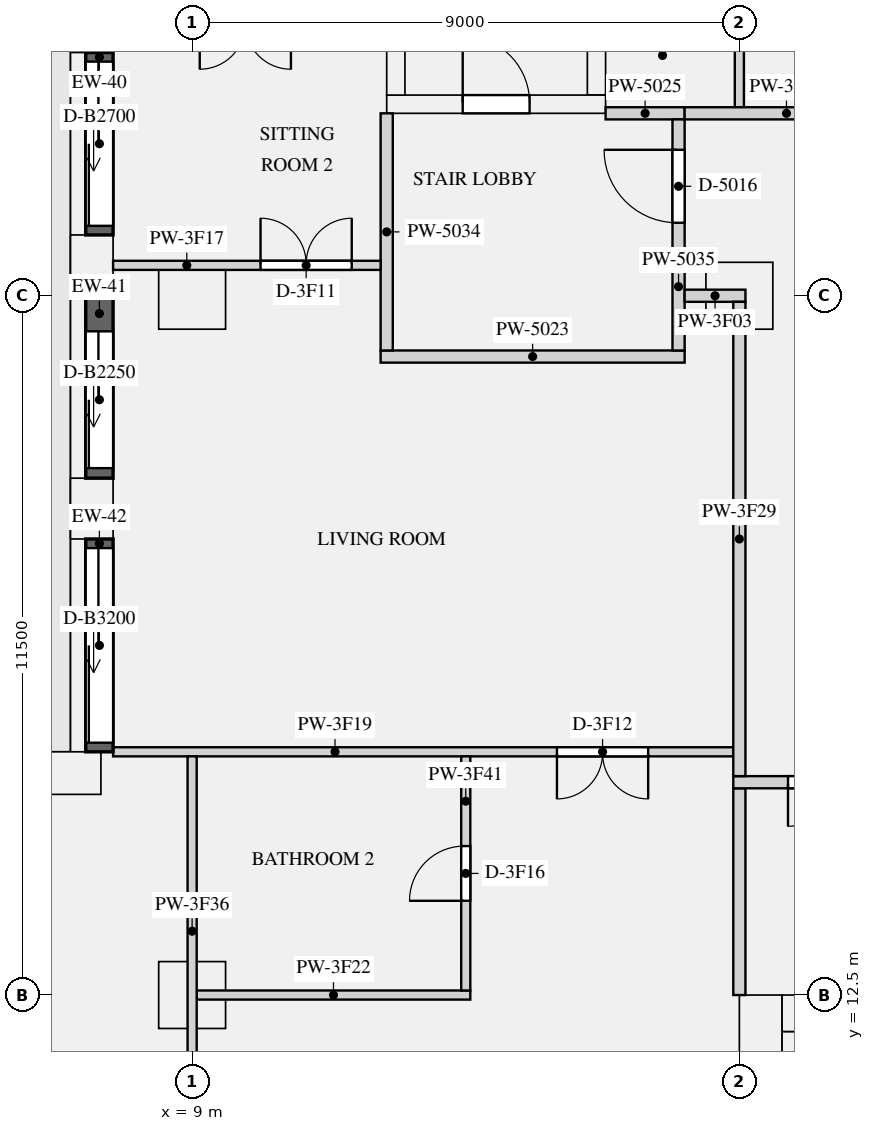
"""IFC4 building model, lengths in metres.
Left out: names, types, materials, properties, quantities, classifications, styles, units other than length and angle.
Written with IfcOpenShell. Run it as: python <this file> out.ifc"""

import sys

from ifc_helpers import new_model, si_unit, direction, frame, frame_2d, origin, origin_2d, place, context, subcontext, project, spatial, rectangle, extrude, element, fill, save


model = new_model("IFC4")
c1 = context("Model", 3, precision=1e-05, world=origin(), true_north=direction((0.0, 1.0)))
c2 = subcontext(c1, "Body", "Model", "MODEL_VIEW")
j1 = project(units=[si_unit("LENGTHUNIT", "METRE"), si_unit("PLANEANGLEUNIT", "RADIAN")], contexts=[c1])
p1 = place(None, origin())
s1 = spatial("IfcSite", under=j1, at=p1, CompositionType="ELEMENT")
p2 = place(p1, origin())
s2 = spatial("IfcBuilding", under=s1, at=p2, CompositionType="ELEMENT")
p3 = place(p2, frame((0.0, 0.0, 182.25)))
s3 = spatial("IfcBuildingStorey", under=s2, at=p3, CompositionType="ELEMENT", Elevation=182.25)
for number, where, z_axis, x_axis in (
    (1, (7.35, 24.5, 0.0), (0.0, 0.0, 1.0), (0.0, -1.0, 0.0)),
    (2, (7.35, 20.5, 0.0), (0.0, 0.0, 1.0), (0.0, -1.0, 0.0)),
    (3, (7.0, 16.15, 0.0), (0.0, 0.0, 1.0), (-1.0, 0.0, 0.0)),
):
    element("IfcColumn", number, at=place(p3, frame(where, z_axis=z_axis, x_axis=x_axis)), inside=s3, PredefinedType="USERDEFINED", context=c2, shape_type="SweptSolid", body=[
        extrude(rectangle(XDim=1.0, YDim=0.7, at=origin_2d()), origin(), (0.0, 0.0, 1.0), 2.65),
    ])
for number, where, z_axis, x_axis in (
    (4, (9.0, 24.0, 0.0), (0.0, 0.0, 1.0), (1.0, 0.0, 0.0)),
    (5, (18.0, 24.0, 0.0), (0.0, 0.0, 1.0), (1.0, 0.0, 0.0)),
    (6, (9.0, 12.5, 0.0), (0.0, 0.0, 1.0), (1.0, 0.0, 0.0)),
):
    element("IfcColumn", number, at=place(p3, frame(where, z_axis=z_axis, x_axis=x_axis)), inside=s3, PredefinedType="COLUMN", context=c2, shape_type="SweptSolid", body=[
        extrude(rectangle(XDim=1.1, YDim=1.1, at=origin_2d()), origin(), (0.0, 0.0, 1.0), 3.15),
    ])
p4 = place(p3, frame((18.35, 0.0, 0.0), z_axis=(0.0, 0.0, 1.0), x_axis=(0.0, 1.0, 0.0)))
e7 = element("IfcWall", 7, at=p4, inside=s3, PredefinedType="SHEAR", context=c2, shape_type="SweptSolid", body=[
    extrude(rectangle(XDim=12.5, YDim=0.7, at=frame_2d((6.25, 0.0))), origin(), (0.0, 0.0, 1.0), 3.15),
])
p5 = place(p3, frame((18.7, 12.2, 0.0), z_axis=(0.0, 0.0, 1.0), x_axis=(1.0, 0.0, 0.0)))
e8 = element("IfcWall", 8, at=p5, inside=s3, PredefinedType="SHEAR", context=c2, shape_type="SweptSolid", body=[
    extrude(rectangle(XDim=34.6, YDim=0.6, at=frame_2d((17.3, 0.0))), origin(), (0.0, 0.0, 1.0), 3.15),
])
p6 = place(p5, frame((24.475, 0.0, 0.0)))
e9 = element("IfcOpeningElement", 9, at=p6, cuts=e8, PredefinedType="OPENING", context=c2, shape_type="SweptSolid", body=[
    extrude(rectangle(XDim=1.1, YDim=2.1, at=frame_2d((0.55, 1.05))), frame((0.0, 0.31, 0.0), z_axis=(0.0, -1.0, 0.0), x_axis=(1.0, 0.0, 0.0)), (0.0, 0.0, 1.0), 0.62),
])
p7 = place(p5, frame((26.725, 0.0, 0.0)))
e10 = element("IfcOpeningElement", 10, at=p7, cuts=e8, PredefinedType="OPENING", context=c2, shape_type="SweptSolid", body=[
    extrude(rectangle(XDim=1.1, YDim=2.1, at=frame_2d((0.55, 1.05))), frame((0.0, 0.31, 0.0), z_axis=(0.0, -1.0, 0.0), x_axis=(1.0, 0.0, 0.0)), (0.0, 0.0, 1.0), 0.62),
])
p8 = place(p5, frame((28.975, 0.0, 0.0)))
e11 = element("IfcOpeningElement", 11, at=p8, cuts=e8, PredefinedType="OPENING", context=c2, shape_type="SweptSolid", body=[
    extrude(rectangle(XDim=1.1, YDim=2.1, at=frame_2d((0.55, 1.05))), frame((0.0, 0.31, 0.0), z_axis=(0.0, -1.0, 0.0), x_axis=(1.0, 0.0, 0.0)), (0.0, 0.0, 1.0), 0.62),
])
p9 = place(p5, frame((4.85, 0.0, 0.0)))
e12 = element("IfcOpeningElement", 12, at=p9, cuts=e8, PredefinedType="OPENING", context=c2, shape_type="SweptSolid", body=[
    extrude(rectangle(XDim=0.9, YDim=2.1, at=frame_2d((0.45, 1.05))), frame((0.0, 0.31, 0.0), z_axis=(0.0, -1.0, 0.0), x_axis=(1.0, 0.0, 0.0)), (0.0, 0.0, 1.0), 0.62),
])
p10 = place(p5, frame((11.85, 0.0, 0.0)))
e13 = element("IfcOpeningElement", 13, at=p10, cuts=e8, PredefinedType="OPENING", context=c2, shape_type="SweptSolid", body=[
    extrude(rectangle(XDim=0.9, YDim=2.1, at=frame_2d((0.45, 1.05))), frame((0.0, 0.31, 0.0), z_axis=(0.0, -1.0, 0.0), x_axis=(1.0, 0.0, 0.0)), (0.0, 0.0, 1.0), 0.62),
])
p11 = place(p5, frame((18.35, 0.0, 0.0)))
e14 = element("IfcOpeningElement", 14, at=p11, cuts=e8, PredefinedType="OPENING", context=c2, shape_type="SweptSolid", body=[
    extrude(rectangle(XDim=0.9, YDim=2.1, at=frame_2d((0.45, 1.05))), frame((0.0, 0.31, 0.0), z_axis=(0.0, -1.0, 0.0), x_axis=(1.0, 0.0, 0.0)), (0.0, 0.0, 1.0), 0.62),
])
p12 = place(p5, frame((1.45, 0.0, 0.0)))
e15 = element("IfcOpeningElement", 15, at=p12, cuts=e8, PredefinedType="OPENING", context=c2, shape_type="SweptSolid", body=[
    extrude(rectangle(XDim=1.2, YDim=2.1, at=frame_2d((0.6, 1.05))), frame((0.0, 0.31, 0.0), z_axis=(0.0, -1.0, 0.0), x_axis=(1.0, 0.0, 0.0)), (0.0, 0.0, 1.0), 0.62),
])
p13 = place(p5, frame((31.95, 0.0, 0.0)))
e16 = element("IfcOpeningElement", 16, at=p13, cuts=e8, PredefinedType="OPENING", context=c2, shape_type="SweptSolid", body=[
    extrude(rectangle(XDim=1.2, YDim=2.1, at=frame_2d((0.6, 1.05))), frame((0.0, 0.31, 0.0), z_axis=(0.0, -1.0, 0.0), x_axis=(1.0, 0.0, 0.0)), (0.0, 0.0, 1.0), 0.62),
])
p14 = place(p3, frame((18.85, 1.0, 0.0), z_axis=(0.0, 0.0, 1.0), x_axis=(0.0, 1.0, 0.0)))
e17 = element("IfcWall", 17, at=p14, inside=s3, PredefinedType="SHEAR", context=c2, shape_type="SweptSolid", body=[
    extrude(rectangle(XDim=10.9, YDim=0.3, at=frame_2d((5.45, 0.0))), origin(), (0.0, 0.0, 1.0), 3.15),
])
p15 = place(p3, frame((12.2, 27.15, 0.0), z_axis=(0.0, 0.0, 1.0), x_axis=(1.0, 0.0, 0.0)))
e18 = element("IfcWall", 18, at=p15, inside=s3, PredefinedType="SHEAR", context=c2, shape_type="SweptSolid", body=[
    extrude(rectangle(XDim=3.6, YDim=0.3, at=frame_2d((1.8, 0.0))), origin(), (0.0, 0.0, 1.0), 3.15),
])
p16 = place(p15, frame((1.25, 0.0, 0.0)))
e19 = element("IfcOpeningElement", 19, at=p16, cuts=e18, PredefinedType="OPENING", context=c2, shape_type="SweptSolid", body=[
    extrude(rectangle(XDim=1.1, YDim=2.1, at=frame_2d((0.55, 1.05))), frame((0.0, 0.16, 0.0), z_axis=(0.0, -1.0, 0.0), x_axis=(1.0, 0.0, 0.0)), (0.0, 0.0, 1.0), 0.32),
])
for number, where, z_axis, x_axis in (
    (20, (12.35, 27.3, 0.0), (0.0, 0.0, 1.0), (0.0, 1.0, 0.0)),
    (21, (15.65, 27.3, 0.0), (0.0, 0.0, 1.0), (0.0, 1.0, 0.0)),
):
    element("IfcWall", number, at=place(p3, frame(where, z_axis=z_axis, x_axis=x_axis)), inside=s3, PredefinedType="SHEAR", context=c2, shape_type="SweptSolid", body=[
        extrude(rectangle(XDim=7.8, YDim=0.3, at=frame_2d((3.9, 0.0))), origin(), (0.0, 0.0, 1.0), 3.15),
    ])
p17 = place(p3, frame((7.475, 28.0, 0.0), z_axis=(0.0, 0.0, 1.0), x_axis=(0.0, -1.0, 0.0)))
e22 = element("IfcWall", 22, at=p17, inside=s3, PredefinedType="SOLIDWALL", context=c2, shape_type="SweptSolid", body=[
    extrude(rectangle(XDim=3.0, YDim=0.45, at=frame_2d((1.5, 0.0))), origin(), (0.0, 0.0, 1.0), 2.65),
])
p18 = place(p17, frame((0.15, 0.0, 0.0)))
e23 = element("IfcOpeningElement", 23, at=p18, cuts=e22, PredefinedType="OPENING", context=c2, shape_type="SweptSolid", body=[
    extrude(rectangle(XDim=2.7, YDim=2.3, at=frame_2d((1.35, 1.15))), frame((0.0, 0.235, 0.0), z_axis=(0.0, -1.0, 0.0), x_axis=(1.0, 0.0, 0.0)), (0.0, 0.0, 1.0), 0.47),
])
p19 = place(p3, frame((7.475, 24.0, 0.0), z_axis=(0.0, 0.0, 1.0), x_axis=(0.0, -1.0, 0.0)))
e24 = element("IfcWall", 24, at=p19, inside=s3, PredefinedType="SOLIDWALL", context=c2, shape_type="SweptSolid", body=[
    extrude(rectangle(XDim=3.0, YDim=0.45, at=frame_2d((1.5, 0.0))), origin(), (0.0, 0.0, 1.0), 2.65),
])
p20 = place(p19, frame((0.585, 0.0, 0.0)))
e25 = element("IfcOpeningElement", 25, at=p20, cuts=e24, PredefinedType="OPENING", context=c2, shape_type="SweptSolid", body=[
    extrude(rectangle(XDim=2.25, YDim=2.3, at=frame_2d((1.125, 1.15))), frame((0.0, 0.235, 0.0), z_axis=(0.0, -1.0, 0.0), x_axis=(1.0, 0.0, 0.0)), (0.0, 0.0, 1.0), 0.47),
])
p21 = place(p3, frame((7.475, 20.0, 0.0), z_axis=(0.0, 0.0, 1.0), x_axis=(0.0, -1.0, 0.0)))
e26 = element("IfcWall", 26, at=p21, inside=s3, PredefinedType="SOLIDWALL", context=c2, shape_type="SweptSolid", body=[
    extrude(rectangle(XDim=3.5, YDim=0.45, at=frame_2d((1.75, 0.0))), origin(), (0.0, 0.0, 1.0), 2.65),
])
p22 = place(p21, frame((0.15, 0.0, 0.0)))
e27 = element("IfcOpeningElement", 27, at=p22, cuts=e26, PredefinedType="OPENING", context=c2, shape_type="SweptSolid", body=[
    extrude(rectangle(XDim=3.2, YDim=2.3, at=frame_2d((1.6, 1.15))), frame((0.0, 0.235, 0.0), z_axis=(0.0, -1.0, 0.0), x_axis=(1.0, 0.0, 0.0)), (0.0, 0.0, 1.0), 0.47),
])
p23 = place(p3, frame((12.1, 23.0, 0.0), z_axis=(0.0, 0.0, 1.0), x_axis=(1.0, 0.0, 0.0)))
e28 = element("IfcWall", 28, at=p23, inside=s3, PredefinedType="PARTITIONING", context=c2, shape_type="SweptSolid", body=[
    extrude(rectangle(XDim=5.0, YDim=0.2, at=frame_2d((2.5, 0.0))), origin(), (0.0, 0.0, 1.0), 2.65),
])
p24 = place(p3, frame((15.8, 27.0, 0.0), z_axis=(0.0, 0.0, 1.0), x_axis=(1.0, 0.0, 0.0)))
e29 = element("IfcWall", 29, at=p24, inside=s3, PredefinedType="PARTITIONING", context=c2, shape_type="SweptSolid", body=[
    extrude(rectangle(XDim=1.3, YDim=0.2, at=frame_2d((0.65, 0.0))), origin(), (0.0, 0.0, 1.0), 2.65),
])
p25 = place(p3, frame((18.0, 12.5, 0.0), z_axis=(0.0, 0.0, 1.0), x_axis=(0.0, 1.0, 0.0)))
e30 = element("IfcWall", 30, at=p25, inside=s3, PredefinedType="PARTITIONING", context=c2, shape_type="SweptSolid", body=[
    extrude(rectangle(XDim=3.4, YDim=0.2, at=frame_2d((1.7, 0.0))), origin(), (0.0, 0.0, 1.0), 2.65),
])
p26 = place(p3, frame((12.2, 23.1, 0.0), z_axis=(0.0, 0.0, 1.0), x_axis=(0.0, 1.0, 0.0)))
e31 = element("IfcWall", 31, at=p26, inside=s3, PredefinedType="PARTITIONING", context=c2, shape_type="SweptSolid", body=[
    extrude(rectangle(XDim=3.9, YDim=0.2, at=frame_2d((1.95, 0.0))), origin(), (0.0, 0.0, 1.0), 2.65),
])
p27 = place(p3, frame((17.0, 23.1, 0.0), z_axis=(0.0, 0.0, 1.0), x_axis=(0.0, 1.0, 0.0)))
e32 = element("IfcWall", 32, at=p27, inside=s3, PredefinedType="PARTITIONING", context=c2, shape_type="SweptSolid", body=[
    extrude(rectangle(XDim=3.8, YDim=0.2, at=frame_2d((1.9, 0.0))), origin(), (0.0, 0.0, 1.0), 2.65),
])
p28 = place(p27, frame((2.1, 0.0, 0.0)))
e33 = element("IfcOpeningElement", 33, at=p28, cuts=e32, PredefinedType="OPENING", context=c2, shape_type="SweptSolid", body=[
    extrude(rectangle(XDim=1.2, YDim=2.1, at=frame_2d((0.6, 1.05))), frame((0.0, 0.11, 0.0), z_axis=(0.0, -1.0, 0.0), x_axis=(1.0, 0.0, 0.0)), (0.0, 0.0, 1.0), 0.22),
])
p29 = place(p3, frame((17.1, 24.0, 0.0), z_axis=(0.0, 0.0, 1.0), x_axis=(1.0, 0.0, 0.0)))
e34 = element("IfcWall", 34, at=p29, inside=s3, PredefinedType="PARTITIONING", context=c2, shape_type="SweptSolid", body=[
    extrude(rectangle(XDim=1.0, YDim=0.2, at=frame_2d((0.5, 0.0))), origin(), (0.0, 0.0, 1.0), 2.65),
])
p30 = place(p3, frame((17.1, 27.0, 0.0), z_axis=(0.0, 0.0, 1.0), x_axis=(1.0, 0.0, 0.0)))
e35 = element("IfcWall", 35, at=p30, inside=s3, PredefinedType="PARTITIONING", context=c2, shape_type="SweptSolid", body=[
    extrude(rectangle(XDim=6.975, YDim=0.2, at=frame_2d((3.487, 0.0))), origin(), (0.0, 0.0, 1.0), 2.65),
])
p31 = place(p30, frame((3.35, 0.0, 0.0)))
e36 = element("IfcOpeningElement", 36, at=p31, cuts=e35, PredefinedType="OPENING", context=c2, shape_type="SweptSolid", body=[
    extrude(rectangle(XDim=1.1, YDim=2.1, at=frame_2d((0.55, 1.05))), frame((0.0, 0.11, 0.0), z_axis=(0.0, -1.0, 0.0), x_axis=(1.0, 0.0, 0.0)), (0.0, 0.0, 1.0), 0.22),
])
p32 = place(p3, frame((7.7, 24.5, 0.0), z_axis=(0.0, 0.0, 1.0), x_axis=(1.0, 0.0, 0.0)))
e37 = element("IfcWall", 37, at=p32, inside=s3, PredefinedType="PARTITIONING", context=c2, shape_type="SweptSolid", body=[
    extrude(rectangle(XDim=4.4, YDim=0.15, at=frame_2d((2.2, 0.0))), origin(), (0.0, 0.0, 1.0), 2.65),
])
p33 = place(p32, frame((2.425, 0.0, 0.0)))
e38 = element("IfcOpeningElement", 38, at=p33, cuts=e37, PredefinedType="OPENING", context=c2, shape_type="SweptSolid", body=[
    extrude(rectangle(XDim=1.5, YDim=2.1, at=frame_2d((0.75, 1.05))), frame((0.0, 0.085, 0.0), z_axis=(0.0, -1.0, 0.0), x_axis=(1.0, 0.0, 0.0)), (0.0, 0.0, 1.0), 0.17),
])
p34 = place(p3, frame((7.7, 16.5, 0.0), z_axis=(0.0, 0.0, 1.0), x_axis=(1.0, 0.0, 0.0)))
e39 = element("IfcWall", 39, at=p34, inside=s3, PredefinedType="PARTITIONING", context=c2, shape_type="SweptSolid", body=[
    extrude(rectangle(XDim=10.2, YDim=0.15, at=frame_2d((5.1, 0.0))), origin(), (0.0, 0.0, 1.0), 2.65),
])
p35 = place(p34, frame((7.3, 0.0, 0.0)))
e40 = element("IfcOpeningElement", 40, at=p35, cuts=e39, PredefinedType="OPENING", context=c2, shape_type="SweptSolid", body=[
    extrude(rectangle(XDim=1.5, YDim=2.1, at=frame_2d((0.75, 1.05))), frame((0.0, 0.085, 0.0), z_axis=(0.0, -1.0, 0.0), x_axis=(1.0, 0.0, 0.0)), (0.0, 0.0, 1.0), 0.17),
])
p36 = place(p3, frame((9.075, 12.5, 0.0), z_axis=(0.0, 0.0, 1.0), x_axis=(1.0, 0.0, 0.0)))
e41 = element("IfcWall", 41, at=p36, inside=s3, PredefinedType="PARTITIONING", context=c2, shape_type="SweptSolid", body=[
    extrude(rectangle(XDim=4.5, YDim=0.15, at=frame_2d((2.25, 0.0))), origin(), (0.0, 0.0, 1.0), 2.65),
])
p37 = place(p3, frame((17.9, 16.0, 0.0), z_axis=(0.0, 0.0, 1.0), x_axis=(1.0, 0.0, 0.0)))
e42 = element("IfcWall", 42, at=p37, inside=s3, PredefinedType="PARTITIONING", context=c2, shape_type="SweptSolid", body=[
    extrude(rectangle(XDim=36.2, YDim=0.2, at=frame_2d((18.1, 0.0))), origin(), (0.0, 0.0, 1.0), 2.65),
])
p38 = place(p37, frame((0.9, 0.0, 0.0)))
e43 = element("IfcOpeningElement", 43, at=p38, cuts=e42, PredefinedType="OPENING", context=c2, shape_type="SweptSolid", body=[
    extrude(rectangle(XDim=1.4, YDim=2.1, at=frame_2d((0.7, 1.05))), frame((0.0, 0.11, 0.0), z_axis=(0.0, -1.0, 0.0), x_axis=(1.0, 0.0, 0.0)), (0.0, 0.0, 1.0), 0.22),
])
p39 = place(p37, frame((33.9, 0.0, 0.0)))
e44 = element("IfcOpeningElement", 44, at=p39, cuts=e42, PredefinedType="OPENING", context=c2, shape_type="SweptSolid", body=[
    extrude(rectangle(XDim=1.4, YDim=2.1, at=frame_2d((0.7, 1.05))), frame((0.0, 0.11, 0.0), z_axis=(0.0, -1.0, 0.0), x_axis=(1.0, 0.0, 0.0)), (0.0, 0.0, 1.0), 0.22),
])
p40 = place(p3, frame((18.0, 27.1, 0.0), z_axis=(0.0, 0.0, 1.0), x_axis=(0.0, 1.0, 0.0)))
e45 = element("IfcWall", 45, at=p40, inside=s3, PredefinedType="PARTITIONING", context=c2, shape_type="SweptSolid", body=[
    extrude(rectangle(XDim=4.325, YDim=0.15, at=frame_2d((2.163, 0.0))), origin(), (0.0, 0.0, 1.0), 2.65),
])
p41 = place(p40, frame((1.7, 0.0, 0.0)))
e46 = element("IfcOpeningElement", 46, at=p41, cuts=e45, PredefinedType="OPENING", context=c2, shape_type="SweptSolid", body=[
    extrude(rectangle(XDim=0.9, YDim=2.1, at=frame_2d((0.45, 1.05))), frame((0.0, 0.085, 0.0), z_axis=(0.0, -1.0, 0.0), x_axis=(1.0, 0.0, 0.0)), (0.0, 0.0, 1.0), 0.17),
])
p42 = place(p3, frame((18.0, 16.1, 0.0), z_axis=(0.0, 0.0, 1.0), x_axis=(0.0, 1.0, 0.0)))
e47 = element("IfcWall", 47, at=p42, inside=s3, PredefinedType="PARTITIONING", context=c2, shape_type="SweptSolid", body=[
    extrude(rectangle(XDim=7.8, YDim=0.2, at=frame_2d((3.9, 0.0))), origin(), (0.0, 0.0, 1.0), 2.65),
])
p43 = place(p3, frame((9.0, 5.2, 0.0), z_axis=(0.0, 0.0, 1.0), x_axis=(0.0, 1.0, 0.0)))
e48 = element("IfcWall", 48, at=p43, inside=s3, PredefinedType="PARTITIONING", context=c2, shape_type="SweptSolid", body=[
    extrude(rectangle(XDim=11.225, YDim=0.15, at=frame_2d((5.613, 0.0))), origin(), (0.0, 0.0, 1.0), 2.65),
])
p44 = place(p43, frame((4.575, 0.0, 0.0)))
e49 = element("IfcOpeningElement", 49, at=p44, cuts=e48, PredefinedType="OPENING", context=c2, shape_type="SweptSolid", body=[
    extrude(rectangle(XDim=0.9, YDim=2.1, at=frame_2d((0.45, 1.05))), frame((0.0, 0.085, 0.0), z_axis=(0.0, -1.0, 0.0), x_axis=(1.0, 0.0, 0.0)), (0.0, 0.0, 1.0), 0.17),
])
p45 = place(p3, frame((13.5, 12.575, 0.0), z_axis=(0.0, 0.0, 1.0), x_axis=(0.0, 1.0, 0.0)))
e50 = element("IfcWall", 50, at=p45, inside=s3, PredefinedType="PARTITIONING", context=c2, shape_type="SweptSolid", body=[
    extrude(rectangle(XDim=3.85, YDim=0.15, at=frame_2d((1.925, 0.0))), origin(), (0.0, 0.0, 1.0), 2.65),
])
p46 = place(p45, frame((1.475, 0.0, 0.0)))
e51 = element("IfcOpeningElement", 51, at=p46, cuts=e50, PredefinedType="OPENING", context=c2, shape_type="SweptSolid", body=[
    extrude(rectangle(XDim=0.9, YDim=2.1, at=frame_2d((0.45, 1.05))), frame((0.0, 0.085, 0.0), z_axis=(0.0, -1.0, 0.0), x_axis=(1.0, 0.0, 0.0)), (0.0, 0.0, 1.0), 0.17),
])
p47 = place(p18, origin())
e52 = element("IfcDoor", 52, at=p47, inside=s3, OperationType="SLIDING_TO_LEFT", PredefinedType="DOOR", context=c2, shape_type="SweptSolid", body=[
    extrude(rectangle(XDim=2.7, YDim=2.3, at=frame_2d((1.35, 1.15))), frame((0.0, -0.07, 0.0), z_axis=(0.0, -1.0, 0.0), x_axis=(1.0, 0.0, 0.0)), (0.0, 0.0, 1.0), 0.05),
])
fill(e23, e52)
p48 = place(p20, origin())
e53 = element("IfcDoor", 53, at=p48, inside=s3, OperationType="SLIDING_TO_LEFT", PredefinedType="DOOR", context=c2, shape_type="SweptSolid", body=[
    extrude(rectangle(XDim=2.25, YDim=2.3, at=frame_2d((1.125, 1.15))), frame((0.0, -0.07, 0.0), z_axis=(0.0, -1.0, 0.0), x_axis=(1.0, 0.0, 0.0)), (0.0, 0.0, 1.0), 0.05),
])
fill(e25, e53)
p49 = place(p22, origin())
e54 = element("IfcDoor", 54, at=p49, inside=s3, OperationType="SLIDING_TO_LEFT", PredefinedType="DOOR", context=c2, shape_type="SweptSolid", body=[
    extrude(rectangle(XDim=3.2, YDim=2.3, at=frame_2d((1.6, 1.15))), frame((0.0, -0.07, 0.0), z_axis=(0.0, -1.0, 0.0), x_axis=(1.0, 0.0, 0.0)), (0.0, 0.0, 1.0), 0.05),
])
fill(e27, e54)
p50 = place(p16, origin())
e55 = element("IfcDoor", 55, at=p50, inside=s3, OperationType="SINGLE_SWING_LEFT", PredefinedType="DOOR", context=c2, shape_type="SweptSolid", body=[
    extrude(rectangle(XDim=1.1, YDim=2.1, at=frame_2d((0.55, 1.05))), frame((0.0, 0.025, 0.0), z_axis=(0.0, -1.0, 0.0), x_axis=(1.0, 0.0, 0.0)), (0.0, 0.0, 1.0), 0.05),
])
fill(e19, e55)
p51 = place(p28, origin())
e56 = element("IfcDoor", 56, at=p51, inside=s3, OperationType="SINGLE_SWING_RIGHT", PredefinedType="DOOR", context=c2, shape_type="SweptSolid", body=[
    extrude(rectangle(XDim=1.2, YDim=2.1, at=frame_2d((0.6, 1.05))), frame((0.0, 0.025, 0.0), z_axis=(0.0, -1.0, 0.0), x_axis=(1.0, 0.0, 0.0)), (0.0, 0.0, 1.0), 0.05),
])
fill(e33, e56)
p52 = place(p38, frame((1.4, 0.0, 0.0), z_axis=(0.0, 0.0, 1.0), x_axis=(-1.0, 0.0, 0.0)))
e57 = element("IfcDoor", 57, at=p52, inside=s3, OperationType="DOUBLE_DOOR_SINGLE_SWING", PredefinedType="DOOR", context=c2, shape_type="SweptSolid", body=[
    extrude(rectangle(XDim=1.4, YDim=2.1, at=frame_2d((0.7, 1.05))), frame((0.0, 0.025, 0.0), z_axis=(0.0, -1.0, 0.0), x_axis=(1.0, 0.0, 0.0)), (0.0, 0.0, 1.0), 0.05),
])
fill(e43, e57)
p53 = place(p33, origin())
e58 = element("IfcDoor", 58, at=p53, inside=s3, OperationType="DOUBLE_DOOR_SINGLE_SWING", PredefinedType="DOOR", context=c2, shape_type="SweptSolid", body=[
    extrude(rectangle(XDim=1.5, YDim=2.1, at=frame_2d((0.75, 1.05))), frame((0.0, 0.025, 0.0), z_axis=(0.0, -1.0, 0.0), x_axis=(1.0, 0.0, 0.0)), (0.0, 0.0, 1.0), 0.05),
])
fill(e38, e58)
p54 = place(p35, frame((1.5, 0.0, 0.0), z_axis=(0.0, 0.0, 1.0), x_axis=(-1.0, 0.0, 0.0)))
e59 = element("IfcDoor", 59, at=p54, inside=s3, OperationType="DOUBLE_DOOR_SINGLE_SWING", PredefinedType="DOOR", context=c2, shape_type="SweptSolid", body=[
    extrude(rectangle(XDim=1.5, YDim=2.1, at=frame_2d((0.75, 1.05))), frame((0.0, 0.025, 0.0), z_axis=(0.0, -1.0, 0.0), x_axis=(1.0, 0.0, 0.0)), (0.0, 0.0, 1.0), 0.05),
])
fill(e40, e59)
p55 = place(p46, origin())
e60 = element("IfcDoor", 60, at=p55, inside=s3, OperationType="SINGLE_SWING_LEFT", PredefinedType="DOOR", context=c2, shape_type="SweptSolid", body=[
    extrude(rectangle(XDim=0.9, YDim=2.1, at=frame_2d((0.45, 1.05))), frame((0.0, 0.025, 0.0), z_axis=(0.0, -1.0, 0.0), x_axis=(1.0, 0.0, 0.0)), (0.0, 0.0, 1.0), 0.05),
])
fill(e51, e60)
save(model, sys.argv[1])
